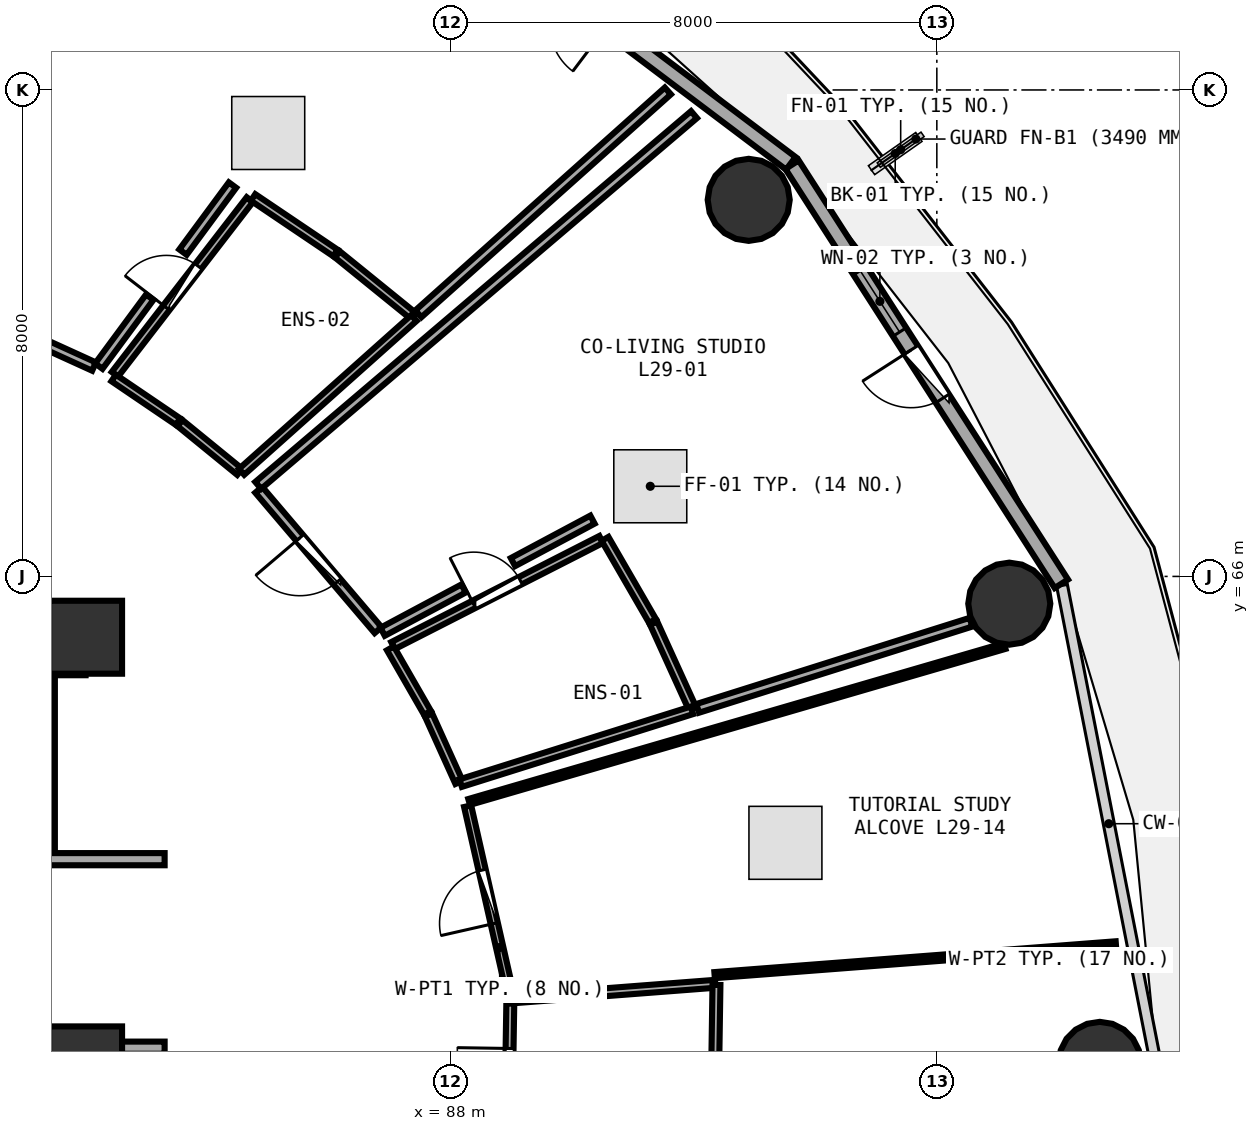
"""IFC4 building model, lengths in metres.
Left out: names, types, materials, properties, quantities, classifications, styles, units other than length and angle.
Written with IfcOpenShell. Run it as: python <this file> out.ifc"""

import sys

from ifc_helpers import new_model, si_unit, direction, frame, frame_2d, origin, origin_2d, place, context, subcontext, project, spatial, rectangle, circle, extrude, element, fill, save


model = new_model("IFC4")
c1 = context("Model", 3, precision=1e-05, world=origin(), true_north=direction((0.0, 1.0)))
c2 = subcontext(c1, "Body", "Model", "MODEL_VIEW")
j1 = project(units=[si_unit("LENGTHUNIT", "METRE"), si_unit("PLANEANGLEUNIT", "RADIAN")], contexts=[c1])
p1 = place(None, origin())
s1 = spatial("IfcSite", under=j1, at=p1, CompositionType="ELEMENT")
p2 = place(p1, origin())
s2 = spatial("IfcBuilding", under=s1, at=p2, CompositionType="ELEMENT")
p3 = place(p2, frame((0.0, 0.0, 113.85)))
s3 = spatial("IfcBuildingStorey", under=s2, at=p3, CompositionType="ELEMENT", Elevation=113.85)
for number, where, z_axis, x_axis in (
    (1, (82.0, 58.0, 0.0), (0.0, 0.0, 1.0), (1.0, 0.0, 0.0)),
    (2, (82.0, 65.0, 0.0), (0.0, 0.0, 1.0), (1.0, 0.0, 0.0)),
):
    element("IfcColumn", number, at=place(p3, frame(where, z_axis=z_axis, x_axis=x_axis)), inside=s3, PredefinedType="PILASTER", context=c2, shape_type="SweptSolid", body=[
        extrude(rectangle(XDim=1.2, YDim=1.2, at=origin_2d()), origin(), (0.0, 0.0, 1.0), 3.75),
    ])
for number, where, z_axis, x_axis in (
    (3, (98.68, 58.0, 0.0), (0.0, 0.0, 1.0), (1.0, 0.0, 0.0)),
    (4, (97.192, 65.552, 0.0), (0.0, 0.0, 1.0), (1.0, 0.0, 0.0)),
    (5, (92.906, 72.193, 0.0), (0.0, 0.0, 1.0), (1.0, 0.0, 0.0)),
):
    element("IfcColumn", number, at=place(p3, frame(where, z_axis=z_axis, x_axis=x_axis)), inside=s3, PredefinedType="COLUMN", context=c2, shape_type="SweptSolid", body=[
        extrude(circle(Radius=0.675, at=origin_2d()), origin(), (0.0, 0.0, 1.0), 3.75),
    ])
p4 = place(p3, frame((98.048, 65.879, 0.0), z_axis=(0.0, 0.0, 1.0), x_axis=(-0.540620528459, 0.841266571432, 0.0)))
e6 = element("IfcWall", 6, at=p4, inside=s3, PredefinedType="SOLIDWALL", context=c2, shape_type="SweptSolid", body=[
    extrude(rectangle(XDim=8.193, YDim=0.26, at=frame_2d((4.096, 0.0))), origin(), (0.0, 0.0, 1.0), 3.475),
])
p5 = place(p4, frame((3.621, 0.0, 0.0)))
e7 = element("IfcOpeningElement", 7, at=p5, cuts=e6, PredefinedType="OPENING", context=c2, shape_type="SweptSolid", body=[
    extrude(rectangle(XDim=0.95, YDim=2.1, at=frame_2d((0.475, 1.05))), frame((0.0, 0.14, 0.0), z_axis=(0.0, -1.0, 0.0), x_axis=(1.0, 0.0, 0.0)), (0.0, 0.0, 1.0), 0.28),
])
p6 = place(p4, frame((4.921, 0.0, 0.85)))
e8 = element("IfcOpeningElement", 8, at=p6, cuts=e6, PredefinedType="OPENING", context=c2, shape_type="SweptSolid", body=[
    extrude(rectangle(XDim=1.2, YDim=1.45, at=frame_2d((0.6, 0.725))), frame((0.0, 0.14, 0.0), z_axis=(0.0, -1.0, 0.0), x_axis=(1.0, 0.0, 0.0)), (0.0, 0.0, 1.0), 0.28),
])
p7 = place(p3, frame((93.599, 72.793, 0.0), z_axis=(0.0, 0.0, 1.0), x_axis=(-0.798501507879, 0.601992808857, 0.0)))
e9 = element("IfcWall", 9, at=p7, inside=s3, PredefinedType="SOLIDWALL", context=c2, shape_type="SweptSolid", body=[
    extrude(rectangle(XDim=8.499, YDim=0.26, at=frame_2d((4.25, 0.0))), origin(), (0.0, 0.0, 1.0), 3.475),
])
p8 = place(p7, frame((3.775, 0.0, 0.0)))
e10 = element("IfcOpeningElement", 10, at=p8, cuts=e9, PredefinedType="OPENING", context=c2, shape_type="SweptSolid", body=[
    extrude(rectangle(XDim=0.95, YDim=2.1, at=frame_2d((0.475, 1.05))), frame((0.0, 0.14, 0.0), z_axis=(0.0, -1.0, 0.0), x_axis=(1.0, 0.0, 0.0)), (0.0, 0.0, 1.0), 0.28),
])
p9 = place(p7, frame((5.075, 0.0, 0.85)))
e11 = element("IfcOpeningElement", 11, at=p9, cuts=e9, PredefinedType="OPENING", context=c2, shape_type="SweptSolid", body=[
    extrude(rectangle(XDim=1.2, YDim=1.45, at=frame_2d((0.6, 0.725))), frame((0.0, 0.14, 0.0), z_axis=(0.0, -1.0, 0.0), x_axis=(1.0, 0.0, 0.0)), (0.0, 0.0, 1.0), 0.28),
])
p10 = place(p3, frame((74.0, 64.6, 0.0), z_axis=(0.0, 0.0, 1.0), x_axis=(1.0, 0.0, 0.0)))
e12 = element("IfcWall", 12, at=p10, inside=s3, PredefinedType="SHEAR", context=c2, shape_type="SweptSolid", body=[
    extrude(rectangle(XDim=8.0, YDim=0.45, at=frame_2d((4.0, 0.0))), origin(), (0.0, 0.0, 1.0), 3.49),
])
p11 = place(p3, frame((79.3, 61.35, 0.0), z_axis=(0.0, 0.0, 1.0), x_axis=(1.0, 0.0, 0.0)))
e13 = element("IfcWall", 13, at=p11, inside=s3, PredefinedType="SOLIDWALL", context=c2, shape_type="SweptSolid", body=[
    extrude(rectangle(XDim=4.0, YDim=0.2, at=frame_2d((2.0, 0.0))), origin(), (0.0, 0.0, 1.0), 2.775),
])
p12 = place(p11, frame((0.45, 0.0, 0.0)))
e14 = element("IfcOpeningElement", 14, at=p12, cuts=e13, PredefinedType="OPENING", context=c2, shape_type="SweptSolid", body=[
    extrude(rectangle(XDim=1.2, YDim=2.15, at=frame_2d((0.6, 1.075))), frame((0.0, 0.11, 0.0), z_axis=(0.0, -1.0, 0.0), x_axis=(1.0, 0.0, 0.0)), (0.0, 0.0, 1.0), 0.22),
])
p13 = place(p3, frame((81.42, 61.48, 0.0), z_axis=(0.0, 0.0, 1.0), x_axis=(0.0, 1.0, 0.0)))
e15 = element("IfcWall", 15, at=p13, inside=s3, PredefinedType="PARTITIONING", context=c2, shape_type="SweptSolid", body=[
    extrude(rectangle(XDim=2.84, YDim=0.15, at=frame_2d((1.42, 0.0))), origin(), (0.0, 0.0, 1.0), 3.48),
])
p14 = place(p3, frame((79.3, 58.25, 0.0), z_axis=(0.0, 0.0, 1.0), x_axis=(1.0, 0.0, 0.0)))
e16 = element("IfcWall", 16, at=p14, inside=s3, PredefinedType="SOLIDWALL", context=c2, shape_type="SweptSolid", body=[
    extrude(rectangle(XDim=4.0, YDim=0.2, at=frame_2d((2.0, 0.0))), origin(), (0.0, 0.0, 1.0), 2.775),
])
p15 = place(p14, frame((0.5, 0.0, 0.0)))
e17 = element("IfcOpeningElement", 17, at=p15, cuts=e16, PredefinedType="OPENING", context=c2, shape_type="SweptSolid", body=[
    extrude(rectangle(XDim=1.1, YDim=2.1, at=frame_2d((0.55, 1.05))), frame((0.0, 0.11, 0.0), z_axis=(0.0, -1.0, 0.0), x_axis=(1.0, 0.0, 0.0)), (0.0, 0.0, 1.0), 0.22),
])
p16 = place(p3, frame((87.056, 64.862, 0.0), z_axis=(0.0, 0.0, 1.0), x_axis=(0.890879426821, 0.454239856097, 0.0)))
e18 = element("IfcWall", 18, at=p16, inside=s3, PredefinedType="PLUMBINGWALL", context=c2, shape_type="SweptSolid", body=[
    extrude(rectangle(XDim=3.842, YDim=0.13, at=frame_2d((1.921, 0.0))), origin(), (0.0, 0.0, 1.0), 2.925),
])
p17 = place(p16, frame((1.491, 0.0, 0.0)))
e19 = element("IfcOpeningElement", 19, at=p17, cuts=e18, PredefinedType="OPENING", context=c2, shape_type="SweptSolid", body=[
    extrude(rectangle(XDim=0.86, YDim=2.05, at=frame_2d((0.43, 1.025))), frame((0.0, 0.075, 0.0), z_axis=(0.0, -1.0, 0.0), x_axis=(1.0, 0.0, 0.0)), (0.0, 0.0, 1.0), 0.15),
])
p18 = place(p3, frame((86.811, 65.117, 0.0), z_axis=(0.0, 0.0, 1.0), x_axis=(-0.647807427381, 0.761804132983, 0.0)))
e20 = element("IfcWall", 20, at=p18, inside=s3, PredefinedType="PARTITIONING", context=c2, shape_type="SweptSolid", body=[
    extrude(rectangle(XDim=3.031, YDim=0.15, at=frame_2d((1.515, 0.0))), origin(), (0.0, 0.0, 1.0), 2.925),
])
p19 = place(p18, frame((1.04, 0.0, 0.0)))
e21 = element("IfcOpeningElement", 21, at=p19, cuts=e20, PredefinedType="OPENING", context=c2, shape_type="SweptSolid", body=[
    extrude(rectangle(XDim=0.95, YDim=2.08, at=frame_2d((0.475, 1.04))), frame((0.0, 0.085, 0.0), z_axis=(0.0, -1.0, 0.0), x_axis=(1.0, 0.0, 0.0)), (0.0, 0.0, 1.0), 0.17),
])
p20 = place(p3, frame((82.482, 69.323, 0.0), z_axis=(0.0, 0.0, 1.0), x_axis=(0.611256142659, 0.791432832312, 0.0)))
e22 = element("IfcWall", 22, at=p20, inside=s3, PredefinedType="PLUMBINGWALL", context=c2, shape_type="SweptSolid", body=[
    extrude(rectangle(XDim=3.631, YDim=0.13, at=frame_2d((1.816, 0.0))), origin(), (0.0, 0.0, 1.0), 2.925),
])
p21 = place(p20, frame((1.386, 0.0, 0.0)))
e23 = element("IfcOpeningElement", 23, at=p21, cuts=e22, PredefinedType="OPENING", context=c2, shape_type="SweptSolid", body=[
    extrude(rectangle(XDim=0.86, YDim=2.05, at=frame_2d((0.43, 1.025))), frame((0.0, 0.075, 0.0), z_axis=(0.0, -1.0, 0.0), x_axis=(1.0, 0.0, 0.0)), (0.0, 0.0, 1.0), 0.15),
])
p22 = place(p3, frame((82.139, 69.451, 0.0), z_axis=(0.0, 0.0, 1.0), x_axis=(-0.910125689736, 0.414332268696, 0.0)))
e24 = element("IfcWall", 24, at=p22, inside=s3, PredefinedType="PARTITIONING", context=c2, shape_type="SweptSolid", body=[
    extrude(rectangle(XDim=3.162, YDim=0.15, at=frame_2d((1.581, 0.0))), origin(), (0.0, 0.0, 1.0), 2.925),
])
p23 = place(p22, frame((1.106, 0.0, 0.0)))
e25 = element("IfcOpeningElement", 25, at=p23, cuts=e24, PredefinedType="OPENING", context=c2, shape_type="SweptSolid", body=[
    extrude(rectangle(XDim=0.95, YDim=2.08, at=frame_2d((0.475, 1.04))), frame((0.0, 0.085, 0.0), z_axis=(0.0, -1.0, 0.0), x_axis=(1.0, 0.0, 0.0)), (0.0, 0.0, 1.0), 0.17),
])
p24 = place(p3, frame((88.948, 56.632, 0.0), z_axis=(0.0, 0.0, 1.0), x_axis=(0.015790238921, 0.999875326406, 0.0)))
e26 = element("IfcWall", 26, at=p24, inside=s3, PredefinedType="PLUMBINGWALL", context=c2, shape_type="SweptSolid", body=[
    extrude(rectangle(XDim=2.35, YDim=0.13, at=frame_2d((1.175, 0.0))), origin(), (0.0, 0.0, 1.0), 2.925),
])
p25 = place(p24, frame((0.745, 0.0, 0.0)))
e27 = element("IfcOpeningElement", 27, at=p25, cuts=e26, PredefinedType="OPENING", context=c2, shape_type="SweptSolid", body=[
    extrude(rectangle(XDim=0.86, YDim=2.05, at=frame_2d((0.43, 1.025))), frame((0.0, 0.075, 0.0), z_axis=(0.0, -1.0, 0.0), x_axis=(1.0, 0.0, 0.0)), (0.0, 0.0, 1.0), 0.15),
])
p26 = place(p3, frame((88.96, 59.242, 0.0), z_axis=(0.0, 0.0, 1.0), x_axis=(-0.221455296127, 0.975170524481, 0.0)))
e28 = element("IfcWall", 28, at=p26, inside=s3, PredefinedType="PARTITIONING", context=c2, shape_type="SweptSolid", body=[
    extrude(rectangle(XDim=3.055, YDim=0.12, at=frame_2d((1.527, 0.0))), origin(), (0.0, 0.0, 1.0), 3.48),
])
p27 = place(p26, frame((1.077, 0.0, 0.0)))
e29 = element("IfcOpeningElement", 29, at=p27, cuts=e28, PredefinedType="OPENING", context=c2, shape_type="SweptSolid", body=[
    extrude(rectangle(XDim=0.9, YDim=2.08, at=frame_2d((0.45, 1.04))), frame((0.0, 0.07, 0.0), z_axis=(0.0, -1.0, 0.0), x_axis=(1.0, 0.0, 0.0)), (0.0, 0.0, 1.0), 0.14),
])
p28 = place(p3, frame((88.142, 62.613, 0.0), z_axis=(0.0, 0.0, 1.0), x_axis=(-0.412001110445, 0.911183343237, 0.0)))
e30 = element("IfcWall", 30, at=p28, inside=s3, PredefinedType="PLUMBINGWALL", context=c2, shape_type="SweptSolid", body=[
    extrude(rectangle(XDim=1.215, YDim=0.13, at=frame_2d((0.608, 0.0))), origin(), (0.0, 0.0, 1.0), 3.235),
])
p29 = place(p3, frame((87.623, 63.756, 0.0), z_axis=(0.0, 0.0, 1.0), x_axis=(-0.49839243415, 0.866951545118, 0.0)))
e31 = element("IfcWall", 31, at=p29, inside=s3, PredefinedType="PLUMBINGWALL", context=c2, shape_type="SweptSolid", body=[
    extrude(rectangle(XDim=1.224, YDim=0.13, at=frame_2d((0.612, 0.0))), origin(), (0.0, 0.0, 1.0), 3.48),
])
p30 = place(p3, frame((90.543, 66.618, 0.0), z_axis=(0.0, 0.0, 1.0), x_axis=(0.500666062801, -0.865640510581, 0.0)))
e32 = element("IfcWall", 32, at=p30, inside=s3, PredefinedType="PLUMBINGWALL", context=c2, shape_type="SweptSolid", body=[
    extrude(rectangle(XDim=1.56, YDim=0.13, at=frame_2d((0.78, 0.0))), origin(), (0.0, 0.0, 1.0), 2.925),
])
p31 = place(p3, frame((91.342, 65.232, 0.0), z_axis=(0.0, 0.0, 1.0), x_axis=(0.414183029379, -0.910193615762, 0.0)))
e33 = element("IfcWall", 33, at=p31, inside=s3, PredefinedType="PLUMBINGWALL", context=c2, shape_type="SweptSolid", body=[
    extrude(rectangle(XDim=1.549, YDim=0.13, at=frame_2d((0.774, 0.0))), origin(), (0.0, 0.0, 1.0), 2.925),
])
p32 = place(p3, frame((91.973, 63.798, 0.0), z_axis=(0.0, 0.0, 1.0), x_axis=(-0.953881070773, -0.30018478113, 0.0)))
e34 = element("IfcWall", 34, at=p32, inside=s3, PredefinedType="PLUMBINGWALL", context=c2, shape_type="SweptSolid", body=[
    extrude(rectangle(XDim=3.988, YDim=0.13, at=frame_2d((1.994, 0.0))), origin(), (0.0, 0.0, 1.0), 3.175),
])
p33 = place(p3, frame((84.84, 67.497, 0.0), z_axis=(0.0, 0.0, 1.0), x_axis=(0.761665255774, 0.647970707784, 0.0)))
e35 = element("IfcWall", 35, at=p33, inside=s3, PredefinedType="PARTITIONING", context=c2, shape_type="SweptSolid", body=[
    extrude(rectangle(XDim=9.41, YDim=0.15, at=frame_2d((4.705, 0.0))), origin(), (0.0, 0.0, 1.0), 2.975),
])
p34 = place(p3, frame((96.562, 65.247, 0.0), z_axis=(0.0, 0.0, 1.0), x_axis=(-0.953736790079, -0.300642869946, 0.0)))
e36 = element("IfcWall", 36, at=p34, inside=s3, PredefinedType="PARTITIONING", context=c2, shape_type="SweptSolid", body=[
    extrude(rectangle(XDim=4.712, YDim=0.15, at=frame_2d((2.356, 0.0))), origin(), (0.0, 0.0, 1.0), 3.235),
])
p35 = place(p3, frame((90.337, 66.934, 0.0), z_axis=(0.0, 0.0, 1.0), x_axis=(-0.881978876335, -0.471288936533, 0.0)))
e37 = element("IfcWall", 37, at=p35, inside=s3, PredefinedType="PARTITIONING", context=c2, shape_type="SweptSolid", body=[
    extrude(rectangle(XDim=1.483, YDim=0.15, at=frame_2d((0.741, 0.0))), origin(), (0.0, 0.0, 1.0), 3.175),
])
p36 = place(p3, frame((88.218, 65.802, 0.0), z_axis=(0.0, 0.0, 1.0), x_axis=(-0.88197684433, -0.471292739246, 0.0)))
e38 = element("IfcWall", 38, at=p36, inside=s3, PredefinedType="PARTITIONING", context=c2, shape_type="SweptSolid", body=[
    extrude(rectangle(XDim=1.51, YDim=0.15, at=frame_2d((0.755, 0.0))), origin(), (0.0, 0.0, 1.0), 2.925),
])
p37 = place(p3, frame((84.535, 67.719, 0.0), z_axis=(0.0, 0.0, 1.0), x_axis=(-0.77480548173, 0.632199703796, 0.0)))
e39 = element("IfcWall", 39, at=p37, inside=s3, PredefinedType="PLUMBINGWALL", context=c2, shape_type="SweptSolid", body=[
    extrude(rectangle(XDim=1.269, YDim=0.13, at=frame_2d((0.634, 0.0))), origin(), (0.0, 0.0, 1.0), 3.48),
])
p38 = place(p3, frame((83.521, 68.545, 0.0), z_axis=(0.0, 0.0, 1.0), x_axis=(-0.827444121362, 0.561548062077, 0.0)))
e40 = element("IfcWall", 40, at=p38, inside=s3, PredefinedType="PLUMBINGWALL", context=c2, shape_type="SweptSolid", body=[
    extrude(rectangle(XDim=1.28, YDim=0.13, at=frame_2d((0.64, 0.0))), origin(), (0.0, 0.0, 1.0), 2.925),
])
p39 = place(p3, frame((84.755, 72.233, 0.0), z_axis=(0.0, 0.0, 1.0), x_axis=(0.829027028084, -0.559208535974, 0.0)))
e41 = element("IfcWall", 41, at=p39, inside=s3, PredefinedType="PLUMBINGWALL", context=c2, shape_type="SweptSolid", body=[
    extrude(rectangle(XDim=1.634, YDim=0.13, at=frame_2d((0.817, 0.0))), origin(), (0.0, 0.0, 1.0), 2.925),
])
p40 = place(p3, frame((86.142, 71.295, 0.0), z_axis=(0.0, 0.0, 1.0), x_axis=(0.776777676314, -0.629774913425, 0.0)))
e42 = element("IfcWall", 42, at=p40, inside=s3, PredefinedType="PLUMBINGWALL", context=c2, shape_type="SweptSolid", body=[
    extrude(rectangle(XDim=1.619, YDim=0.13, at=frame_2d((0.81, 0.0))), origin(), (0.0, 0.0, 1.0), 3.175),
])
p41 = place(p3, frame((87.4, 70.25, 0.0), z_axis=(0.0, 0.0, 1.0), x_axis=(-0.746071060308, -0.66586633266, 0.0)))
e43 = element("IfcWall", 43, at=p41, inside=s3, PredefinedType="PLUMBINGWALL", context=c2, shape_type="SweptSolid", body=[
    extrude(rectangle(XDim=3.799, YDim=0.13, at=frame_2d((1.899, 0.0))), origin(), (0.0, 0.0, 1.0), 3.175),
])
p42 = place(p3, frame((79.222, 70.823, 0.0), z_axis=(0.0, 0.0, 1.0), x_axis=(0.386794233591, 0.922166048421, 0.0)))
e44 = element("IfcWall", 44, at=p42, inside=s3, PredefinedType="PARTITIONING", context=c2, shape_type="SweptSolid", body=[
    extrude(rectangle(XDim=8.923, YDim=0.15, at=frame_2d((4.461, 0.0))), origin(), (0.0, 0.0, 1.0), 2.925),
])
p43 = place(p3, frame((91.576, 73.983, 0.0), z_axis=(0.0, 0.0, 1.0), x_axis=(-0.745832931832, -0.666133048118, 0.0)))
e45 = element("IfcWall", 45, at=p43, inside=s3, PredefinedType="PARTITIONING", context=c2, shape_type="SweptSolid", body=[
    extrude(rectangle(XDim=5.502, YDim=0.15, at=frame_2d((2.751, 0.0))), origin(), (0.0, 0.0, 1.0), 2.975),
])
p44 = place(p3, frame((84.416, 72.436, 0.0), z_axis=(0.0, 0.0, 1.0), x_axis=(-0.593970327987, -0.804486947981, 0.0)))
e46 = element("IfcWall", 46, at=p44, inside=s3, PredefinedType="PARTITIONING", context=c2, shape_type="SweptSolid", body=[
    extrude(rectangle(XDim=1.371, YDim=0.15, at=frame_2d((0.686, 0.0))), origin(), (0.0, 0.0, 1.0), 3.175),
])
p45 = place(p3, frame((83.055, 70.593, 0.0), z_axis=(0.0, 0.0, 1.0), x_axis=(-0.593972361968, -0.804485446244, 0.0)))
e47 = element("IfcWall", 47, at=p45, inside=s3, PredefinedType="PARTITIONING", context=c2, shape_type="SweptSolid", body=[
    extrude(rectangle(XDim=1.41, YDim=0.15, at=frame_2d((0.705, 0.0))), origin(), (0.0, 0.0, 1.0), 3.235),
])
p46 = place(p3, frame((82.097, 79.235, 0.0), z_axis=(0.0, 0.0, 1.0), x_axis=(-0.361863878041, -0.932230944439, 0.0)))
e48 = element("IfcWall", 48, at=p46, inside=s3, PredefinedType="PARTITIONING", context=c2, shape_type="SweptSolid", body=[
    extrude(rectangle(XDim=5.22, YDim=0.15, at=frame_2d((2.61, 0.0))), origin(), (0.0, 0.0, 1.0), 2.975),
])
p47 = place(p3, frame((89.006, 59.043, 0.0), z_axis=(0.0, 0.0, 1.0), x_axis=(0.997068998962, 0.076507589879, 0.0)))
e49 = element("IfcWall", 49, at=p47, inside=s3, PredefinedType="PLUMBINGWALL", context=c2, shape_type="SweptSolid", body=[
    extrude(rectangle(XDim=3.36, YDim=0.13, at=frame_2d((1.68, 0.0))), origin(), (0.0, 0.0, 1.0), 3.175),
])
p48 = place(p3, frame((92.376, 59.282, 0.0), z_axis=(0.0, 0.0, 1.0), x_axis=(-0.015227474391, -0.99988405529, 0.0)))
e50 = element("IfcWall", 50, at=p48, inside=s3, PredefinedType="PLUMBINGWALL", context=c2, shape_type="SweptSolid", body=[
    extrude(rectangle(XDim=3.046, YDim=0.13, at=frame_2d((1.523, 0.0))), origin(), (0.0, 0.0, 1.0), 2.925),
])
p49 = place(p3, frame((88.308, 62.291, 0.0), z_axis=(0.0, 0.0, 1.0), x_axis=(0.960114392492, 0.279607498701, 0.0)))
e51 = element("IfcWall", 51, at=p49, inside=s3, PredefinedType="PARTITIONING", context=c2, shape_type="SweptSolid", body=[
    extrude(rectangle(XDim=9.173, YDim=0.1, at=frame_2d((4.586, 0.0))), origin(), (0.0, 0.0, 1.0), 2.975),
])
p50 = place(p3, frame((98.945, 59.95, 0.0), z_axis=(0.0, 0.0, 1.0), x_axis=(-0.99706424063, -0.076569576575, 0.0)))
e52 = element("IfcWall", 52, at=p50, inside=s3, PredefinedType="PARTITIONING", context=c2, shape_type="SweptSolid", body=[
    extrude(rectangle(XDim=6.619, YDim=0.1, at=frame_2d((3.31, 0.0))), origin(), (0.0, 0.0, 1.0), 2.975),
])
p51 = place(p5, frame((0.95, 0.0, 0.0), z_axis=(0.0, 0.0, 1.0), x_axis=(-1.0, 0.0, 0.0)))
e53 = element("IfcDoor", 53, at=p51, inside=s3, OperationType="SINGLE_SWING_LEFT", PredefinedType="DOOR", context=c2, shape_type="SweptSolid", body=[
    extrude(rectangle(XDim=0.95, YDim=2.1, at=frame_2d((0.475, 1.05))), frame((0.0, 0.025, 0.0), z_axis=(0.0, -1.0, 0.0), x_axis=(1.0, 0.0, 0.0)), (0.0, 0.0, 1.0), 0.05),
])
fill(e7, e53)
p52 = place(p6, origin())
e54 = element("IfcWindow", 54, at=p52, inside=s3, PartitioningType="SINGLE_PANEL", PredefinedType="WINDOW", context=c2, shape_type="SweptSolid", body=[
    extrude(rectangle(XDim=1.2, YDim=1.45, at=frame_2d((0.6, 0.725))), frame((0.0, 0.03, 0.0), z_axis=(0.0, -1.0, 0.0), x_axis=(1.0, 0.0, 0.0)), (0.0, 0.0, 1.0), 0.06),
])
fill(e8, e54)
p53 = place(p17, origin())
e55 = element("IfcDoor", 55, at=p53, inside=s3, OperationType="SINGLE_SWING_LEFT", PredefinedType="DOOR", context=c2, shape_type="SweptSolid", body=[
    extrude(rectangle(XDim=0.86, YDim=2.05, at=frame_2d((0.43, 1.025))), frame((0.0, 0.025, 0.0), z_axis=(0.0, -1.0, 0.0), x_axis=(1.0, 0.0, 0.0)), (0.0, 0.0, 1.0), 0.05),
])
fill(e19, e55)
p54 = place(p19, origin())
e56 = element("IfcDoor", 56, at=p54, inside=s3, OperationType="SINGLE_SWING_RIGHT", PredefinedType="DOOR", context=c2, shape_type="SweptSolid", body=[
    extrude(rectangle(XDim=0.95, YDim=2.08, at=frame_2d((0.475, 1.04))), frame((0.0, 0.025, 0.0), z_axis=(0.0, -1.0, 0.0), x_axis=(1.0, 0.0, 0.0)), (0.0, 0.0, 1.0), 0.05),
])
fill(e21, e56)
p55 = place(p21, origin())
e57 = element("IfcDoor", 57, at=p55, inside=s3, OperationType="SINGLE_SWING_LEFT", PredefinedType="DOOR", context=c2, shape_type="SweptSolid", body=[
    extrude(rectangle(XDim=0.86, YDim=2.05, at=frame_2d((0.43, 1.025))), frame((0.0, 0.025, 0.0), z_axis=(0.0, -1.0, 0.0), x_axis=(1.0, 0.0, 0.0)), (0.0, 0.0, 1.0), 0.05),
])
fill(e23, e57)
p56 = place(p25, origin())
e58 = element("IfcDoor", 58, at=p56, inside=s3, OperationType="SINGLE_SWING_RIGHT", PredefinedType="DOOR", context=c2, shape_type="SweptSolid", body=[
    extrude(rectangle(XDim=0.86, YDim=2.05, at=frame_2d((0.43, 1.025))), frame((0.0, 0.025, 0.0), z_axis=(0.0, -1.0, 0.0), x_axis=(1.0, 0.0, 0.0)), (0.0, 0.0, 1.0), 0.05),
])
fill(e27, e58)
p57 = place(p27, origin())
e59 = element("IfcDoor", 59, at=p57, inside=s3, OperationType="SINGLE_SWING_LEFT", PredefinedType="DOOR", context=c2, shape_type="SweptSolid", body=[
    extrude(rectangle(XDim=0.9, YDim=2.08, at=frame_2d((0.45, 1.04))), frame((0.0, 0.025, 0.0), z_axis=(0.0, -1.0, 0.0), x_axis=(1.0, 0.0, 0.0)), (0.0, 0.0, 1.0), 0.05),
])
fill(e29, e59)
save(model, sys.argv[1])
